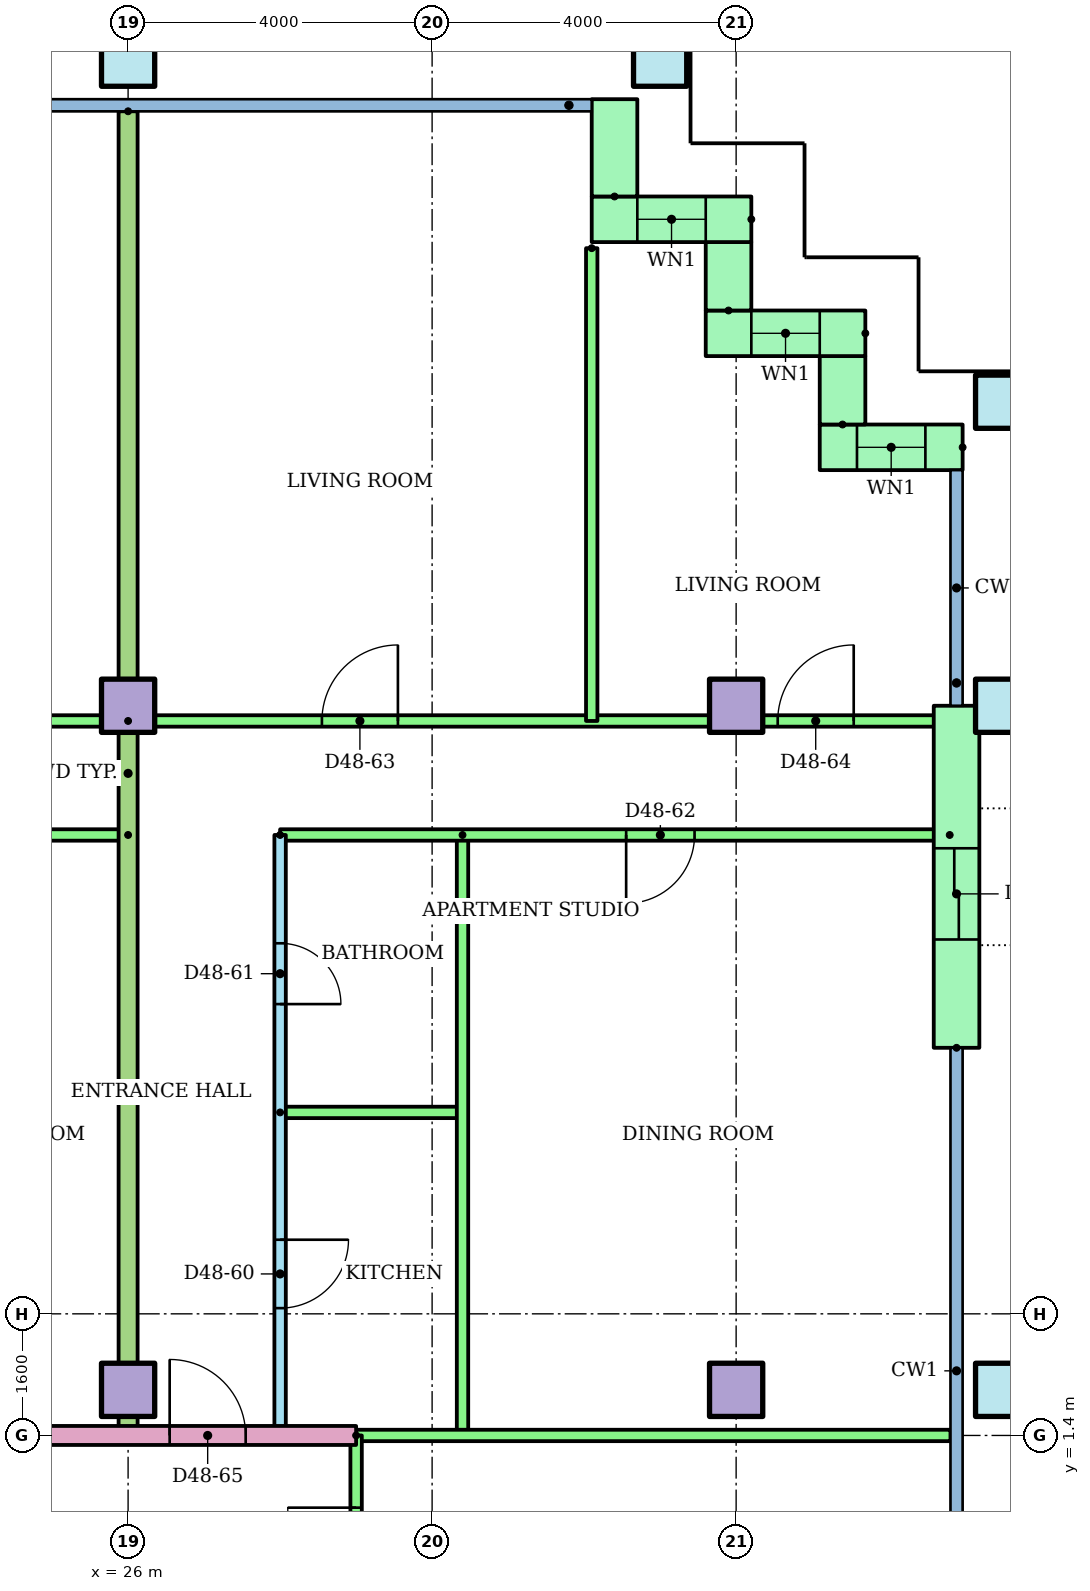
"""IFC4 building model, lengths in metres.
Left out: names, types, materials, properties, quantities, classifications, styles, units other than length and angle.
Written with IfcOpenShell. Run it as: python <this file> out.ifc"""

import sys

from ifc_helpers import new_model, si_unit, direction, frame, frame_2d, origin, origin_2d, place, context, subcontext, project, spatial, rectangle, hollow_rectangle, extrude, element, fill, save


model = new_model("IFC4")
c1 = context("Model", 3, precision=1e-05, world=origin(), true_north=direction((0.0, 1.0)))
c2 = subcontext(c1, "Body", "Model", "MODEL_VIEW")
j1 = project(units=[si_unit("LENGTHUNIT", "METRE"), si_unit("PLANEANGLEUNIT", "RADIAN")], contexts=[c1])
p1 = place(None, origin())
s1 = spatial("IfcSite", under=j1, at=p1, CompositionType="ELEMENT")
p2 = place(p1, origin())
s2 = spatial("IfcBuilding", under=s1, at=p2, CompositionType="ELEMENT")
p3 = place(p2, frame((0.0, 0.0, 184.5)))
s3 = spatial("IfcBuildingStorey", under=s2, at=p3, CompositionType="ELEMENT", Elevation=184.5)
for number, where in (
    (1, (26.0, 2.0, 0.0)),
    (2, (34.0, 2.0, 0.0)),
):
    element("IfcColumn", number, at=place(p3, frame(where)), inside=s3, PredefinedType="COLUMN", context=c2, shape_type="SweptSolid", body=[
        extrude(rectangle(XDim=0.7, YDim=0.7, at=origin_2d()), origin(), (0.0, 0.0, 1.0), 3.2),
    ])
p4 = place(p3, frame((37.5, 2.0, 0.0)))
e3 = element("IfcColumn", 3, at=p4, inside=s3, PredefinedType="COLUMN", context=c2, shape_type="SweptSolid", body=[
    extrude(hollow_rectangle(XDim=0.7, YDim=0.7, WallThickness=0.036, at=origin_2d()), origin(), (0.0, 0.0, 1.0), 3.2),
])
for number, where in (
    (4, (26.0, 11.0, 0.0)),
    (5, (34.0, 11.0, 0.0)),
):
    element("IfcColumn", number, at=place(p3, frame(where)), inside=s3, PredefinedType="COLUMN", context=c2, shape_type="SweptSolid", body=[
        extrude(rectangle(XDim=0.7, YDim=0.7, at=origin_2d()), origin(), (0.0, 0.0, 1.0), 3.2),
    ])
for number, where in (
    (6, (37.5, 11.0, 0.0)),
    (7, (37.5, 15.0, 0.0)),
    (8, (26.0, 19.5, 0.0)),
    (9, (33.0, 19.5, 0.0)),
):
    element("IfcColumn", number, at=place(p3, frame(where)), inside=s3, PredefinedType="COLUMN", context=c2, shape_type="SweptSolid", body=[
        extrude(hollow_rectangle(XDim=0.7, YDim=0.7, WallThickness=0.036, at=origin_2d()), origin(), (0.0, 0.0, 1.0), 3.2),
    ])
p5 = place(p3, frame((36.98, 14.4, 0.0), z_axis=(0.0, 0.0, 1.0), x_axis=(-1.0, 0.0, 0.0)))
e10 = element("IfcWall", 10, at=p5, inside=s3, PredefinedType="STANDARD", context=c2, shape_type="SweptSolid", body=[
    extrude(rectangle(XDim=1.88, YDim=0.6, at=frame_2d((0.94, 0.0))), origin(), (0.0, 0.0, 1.0), 2.92),
])
p6 = place(p5, frame((0.49, 0.0, 0.9)))
e11 = element("IfcOpeningElement", 11, at=p6, cuts=e10, PredefinedType="OPENING", context=c2, shape_type="SweptSolid", body=[
    extrude(rectangle(XDim=0.9, YDim=1.5, at=frame_2d((0.45, 0.75))), frame((0.0, 0.31, 0.0), z_axis=(0.0, -1.0, 0.0), x_axis=(1.0, 0.0, 0.0)), (0.0, 0.0, 1.0), 0.62),
])
p7 = place(p3, frame((35.4, 14.7, 0.0), z_axis=(0.0, 0.0, 1.0), x_axis=(0.0, 1.0, 0.0)))
e12 = element("IfcWall", 12, at=p7, inside=s3, PredefinedType="STANDARD", context=c2, shape_type="SweptSolid", body=[
    extrude(rectangle(XDim=0.9, YDim=0.6, at=frame_2d((0.45, 0.0))), origin(), (0.0, 0.0, 1.0), 2.92),
])
p8 = place(p3, frame((35.7, 15.9, 0.0), z_axis=(0.0, 0.0, 1.0), x_axis=(-1.0, 0.0, 0.0)))
e13 = element("IfcWall", 13, at=p8, inside=s3, PredefinedType="STANDARD", context=c2, shape_type="SweptSolid", body=[
    extrude(rectangle(XDim=2.1, YDim=0.6, at=frame_2d((1.05, 0.0))), origin(), (0.0, 0.0, 1.0), 2.92),
])
p9 = place(p8, frame((0.6, 0.0, 0.9)))
e14 = element("IfcOpeningElement", 14, at=p9, cuts=e13, PredefinedType="OPENING", context=c2, shape_type="SweptSolid", body=[
    extrude(rectangle(XDim=0.9, YDim=1.5, at=frame_2d((0.45, 0.75))), frame((0.0, 0.31, 0.0), z_axis=(0.0, -1.0, 0.0), x_axis=(1.0, 0.0, 0.0)), (0.0, 0.0, 1.0), 0.62),
])
p10 = place(p3, frame((33.9, 16.2, 0.0), z_axis=(0.0, 0.0, 1.0), x_axis=(0.0, 1.0, 0.0)))
e15 = element("IfcWall", 15, at=p10, inside=s3, PredefinedType="STANDARD", context=c2, shape_type="SweptSolid", body=[
    extrude(rectangle(XDim=0.9, YDim=0.6, at=frame_2d((0.45, 0.0))), origin(), (0.0, 0.0, 1.0), 2.92),
])
p11 = place(p3, frame((34.2, 17.4, 0.0), z_axis=(0.0, 0.0, 1.0), x_axis=(-1.0, 0.0, 0.0)))
e16 = element("IfcWall", 16, at=p11, inside=s3, PredefinedType="STANDARD", context=c2, shape_type="SweptSolid", body=[
    extrude(rectangle(XDim=2.1, YDim=0.6, at=frame_2d((1.05, 0.0))), origin(), (0.0, 0.0, 1.0), 2.92),
])
p12 = place(p11, frame((0.6, 0.0, 0.9)))
e17 = element("IfcOpeningElement", 17, at=p12, cuts=e16, PredefinedType="OPENING", context=c2, shape_type="SweptSolid", body=[
    extrude(rectangle(XDim=0.9, YDim=1.5, at=frame_2d((0.45, 0.75))), frame((0.0, 0.31, 0.0), z_axis=(0.0, -1.0, 0.0), x_axis=(1.0, 0.0, 0.0)), (0.0, 0.0, 1.0), 0.62),
])
p13 = place(p3, frame((32.4, 17.7, 0.0), z_axis=(0.0, 0.0, 1.0), x_axis=(0.0, 1.0, 0.0)))
e18 = element("IfcWall", 18, at=p13, inside=s3, PredefinedType="STANDARD", context=c2, shape_type="SweptSolid", body=[
    extrude(rectangle(XDim=1.28, YDim=0.6, at=frame_2d((0.64, 0.0))), origin(), (0.0, 0.0, 1.0), 2.92),
])
p14 = place(p3, frame((36.9, 6.5, 0.0), z_axis=(0.0, 0.0, 1.0), x_axis=(0.0, 1.0, 0.0)))
e19 = element("IfcWall", 19, at=p14, inside=s3, PredefinedType="STANDARD", context=c2, shape_type="SweptSolid", body=[
    extrude(rectangle(XDim=4.5, YDim=0.6, at=frame_2d((2.25, 0.0))), origin(), (0.0, 0.0, 1.0), 2.92),
])
p15 = place(p14, frame((1.425, 0.0, 0.0)))
e20 = element("IfcOpeningElement", 20, at=p15, cuts=e19, PredefinedType="OPENING", context=c2, shape_type="SweptSolid", body=[
    extrude(rectangle(XDim=1.2, YDim=2.1, at=frame_2d((0.6, 1.05))), frame((0.0, 0.31, 0.0), z_axis=(0.0, -1.0, 0.0), x_axis=(1.0, 0.0, 0.0)), (0.0, 0.0, 1.0), 0.62),
])
p16 = place(p3, frame((26.0, 9.3, 0.0), z_axis=(0.0, 0.0, 1.0), x_axis=(-1.0, 0.0, 0.0)))
e21 = element("IfcWall", 21, at=p16, inside=s3, PredefinedType="PARTITIONING", context=c2, shape_type="SweptSolid", body=[
    extrude(rectangle(XDim=10.0, YDim=0.15, at=frame_2d((5.0, 0.0))), origin(), (0.0, 0.0, 1.0), 2.4),
])
p17 = place(p16, frame((4.9, 0.0, 0.0)))
e22 = element("IfcOpeningElement", 22, at=p17, cuts=e21, PredefinedType="OPENING", context=c2, shape_type="SweptSolid", body=[
    extrude(rectangle(XDim=0.9, YDim=2.1, at=frame_2d((0.45, 1.05))), frame((0.0, 0.085, 0.0), z_axis=(0.0, -1.0, 0.0), x_axis=(1.0, 0.0, 0.0)), (0.0, 0.0, 1.0), 0.17),
])
p18 = place(p16, frame((1.1, 0.0, 0.0)))
e23 = element("IfcOpeningElement", 23, at=p18, cuts=e21, PredefinedType="OPENING", context=c2, shape_type="SweptSolid", body=[
    extrude(rectangle(XDim=0.9, YDim=2.1, at=frame_2d((0.45, 1.05))), frame((0.0, 0.085, 0.0), z_axis=(0.0, -1.0, 0.0), x_axis=(1.0, 0.0, 0.0)), (0.0, 0.0, 1.0), 0.17),
])
p19 = place(p3, frame((14.0, 10.8, 0.0)))
e24 = element("IfcWall", 24, at=p19, inside=s3, PredefinedType="PARTITIONING", context=c2, shape_type="SweptSolid", body=[
    extrude(rectangle(XDim=12.0, YDim=0.15, at=frame_2d((6.0, 0.0))), origin(), (0.0, 0.0, 1.0), 2.4),
])
p20 = place(p19, frame((1.5, 0.0, 0.0)))
e25 = element("IfcOpeningElement", 25, at=p20, cuts=e24, PredefinedType="OPENING", context=c2, shape_type="SweptSolid", body=[
    extrude(rectangle(XDim=1.0, YDim=2.1, at=frame_2d((0.5, 1.05))), frame((0.0, 0.085, 0.0), z_axis=(0.0, -1.0, 0.0), x_axis=(1.0, 0.0, 0.0)), (0.0, 0.0, 1.0), 0.17),
])
p21 = place(p19, frame((7.55, 0.0, 0.0)))
e26 = element("IfcOpeningElement", 26, at=p21, cuts=e24, PredefinedType="OPENING", context=c2, shape_type="SweptSolid", body=[
    extrude(rectangle(XDim=0.9, YDim=2.1, at=frame_2d((0.45, 1.05))), frame((0.0, 0.085, 0.0), z_axis=(0.0, -1.0, 0.0), x_axis=(1.0, 0.0, 0.0)), (0.0, 0.0, 1.0), 0.17),
])
p22 = place(p3, frame((28.0, 9.3, 0.0), z_axis=(0.0, 0.0, 1.0), x_axis=(0.0, -1.0, 0.0)))
e27 = element("IfcWall", 27, at=p22, inside=s3, PredefinedType="PARTITIONING", context=c2, shape_type="SweptSolid", body=[
    extrude(rectangle(XDim=7.9, YDim=0.15, at=frame_2d((3.95, 0.0))), origin(), (0.0, 0.0, 1.0), 2.4),
])
p23 = place(p22, frame((5.325, 0.0, 0.0)))
e28 = element("IfcOpeningElement", 28, at=p23, cuts=e27, PredefinedType="OPENING", context=c2, shape_type="SweptSolid", body=[
    extrude(rectangle(XDim=0.9, YDim=2.1, at=frame_2d((0.45, 1.05))), frame((0.0, 0.085, 0.0), z_axis=(0.0, -1.0, 0.0), x_axis=(1.0, 0.0, 0.0)), (0.0, 0.0, 1.0), 0.17),
])
p24 = place(p22, frame((1.425, 0.0, 0.0)))
e29 = element("IfcOpeningElement", 29, at=p24, cuts=e27, PredefinedType="OPENING", context=c2, shape_type="SweptSolid", body=[
    extrude(rectangle(XDim=0.8, YDim=2.1, at=frame_2d((0.4, 1.05))), frame((0.0, 0.085, 0.0), z_axis=(0.0, -1.0, 0.0), x_axis=(1.0, 0.0, 0.0)), (0.0, 0.0, 1.0), 0.17),
])
p25 = place(p3, frame((28.0, 5.65, 0.0)))
e30 = element("IfcWall", 30, at=p25, inside=s3, PredefinedType="PARTITIONING", context=c2, shape_type="SweptSolid", body=[
    extrude(rectangle(XDim=2.4, YDim=0.15, at=frame_2d((1.2, 0.0))), origin(), (0.0, 0.0, 1.0), 2.4),
])
p26 = place(p3, frame((30.4, 9.3, 0.0), z_axis=(0.0, 0.0, 1.0), x_axis=(0.0, -1.0, 0.0)))
e31 = element("IfcWall", 31, at=p26, inside=s3, PredefinedType="PARTITIONING", context=c2, shape_type="SweptSolid", body=[
    extrude(rectangle(XDim=7.9, YDim=0.15, at=frame_2d((3.95, 0.0))), origin(), (0.0, 0.0, 1.0), 2.4),
])
p27 = place(p3, frame((36.81, 9.3, 0.0), z_axis=(0.0, 0.0, 1.0), x_axis=(-1.0, 0.0, 0.0)))
e32 = element("IfcWall", 32, at=p27, inside=s3, PredefinedType="PARTITIONING", context=c2, shape_type="SweptSolid", body=[
    extrude(rectangle(XDim=8.81, YDim=0.15, at=frame_2d((4.405, 0.0))), origin(), (0.0, 0.0, 1.0), 2.4),
])
p28 = place(p27, frame((3.357, 0.0, 0.0)))
e33 = element("IfcOpeningElement", 33, at=p28, cuts=e32, PredefinedType="OPENING", context=c2, shape_type="SweptSolid", body=[
    extrude(rectangle(XDim=0.9, YDim=2.1, at=frame_2d((0.45, 1.05))), frame((0.0, 0.085, 0.0), z_axis=(0.0, -1.0, 0.0), x_axis=(1.0, 0.0, 0.0)), (0.0, 0.0, 1.0), 0.17),
])
p29 = place(p3, frame((26.0, 10.8, 0.0)))
e34 = element("IfcWall", 34, at=p29, inside=s3, PredefinedType="PARTITIONING", context=c2, shape_type="SweptSolid", body=[
    extrude(rectangle(XDim=10.81, YDim=0.15, at=frame_2d((5.405, 0.0))), origin(), (0.0, 0.0, 1.0), 2.4),
])
p30 = place(p29, frame((2.55, 0.0, 0.0)))
e35 = element("IfcOpeningElement", 35, at=p30, cuts=e34, PredefinedType="OPENING", context=c2, shape_type="SweptSolid", body=[
    extrude(rectangle(XDim=1.0, YDim=2.1, at=frame_2d((0.5, 1.05))), frame((0.0, 0.085, 0.0), z_axis=(0.0, -1.0, 0.0), x_axis=(1.0, 0.0, 0.0)), (0.0, 0.0, 1.0), 0.17),
])
p31 = place(p29, frame((8.547, 0.0, 0.0)))
e36 = element("IfcOpeningElement", 36, at=p31, cuts=e34, PredefinedType="OPENING", context=c2, shape_type="SweptSolid", body=[
    extrude(rectangle(XDim=1.0, YDim=2.1, at=frame_2d((0.5, 1.05))), frame((0.0, 0.085, 0.0), z_axis=(0.0, -1.0, 0.0), x_axis=(1.0, 0.0, 0.0)), (0.0, 0.0, 1.0), 0.17),
])
p32 = place(p3, frame((32.1, 17.02, 0.0), z_axis=(0.0, 0.0, 1.0), x_axis=(0.0, -1.0, 0.0)))
e37 = element("IfcWall", 37, at=p32, inside=s3, PredefinedType="PARTITIONING", context=c2, shape_type="SweptSolid", body=[
    extrude(rectangle(XDim=6.22, YDim=0.15, at=frame_2d((3.11, 0.0))), origin(), (0.0, 0.0, 1.0), 2.4),
])
p33 = place(p3, frame((26.0, 18.821, 0.0), z_axis=(0.0, 0.0, 1.0), x_axis=(0.0, -1.0, 0.0)))
e38 = element("IfcWall", 38, at=p33, inside=s3, PredefinedType="PARTITIONING", context=c2, shape_type="SweptSolid", body=[
    extrude(rectangle(XDim=17.421, YDim=0.25, at=frame_2d((8.71, 0.0))), origin(), (0.0, 0.0, 1.0), 2.4),
])
p34 = place(p3, frame((14.0, 1.4, 0.0)))
e39 = element("IfcWall", 39, at=p34, inside=s3, PredefinedType="PARTITIONING", context=c2, shape_type="SweptSolid", body=[
    extrude(rectangle(XDim=15.0, YDim=0.25, at=frame_2d((7.5, 0.0))), origin(), (0.0, 0.0, 1.0), 2.4),
])
p35 = place(p34, frame((0.5, 0.0, 0.0)))
e40 = element("IfcOpeningElement", 40, at=p35, cuts=e39, PredefinedType="OPENING", context=c2, shape_type="SweptSolid", body=[
    extrude(rectangle(XDim=1.0, YDim=2.1, at=frame_2d((0.5, 1.05))), frame((0.0, 0.135, 0.0), z_axis=(0.0, -1.0, 0.0), x_axis=(1.0, 0.0, 0.0)), (0.0, 0.0, 1.0), 0.27),
])
p36 = place(p34, frame((12.547, 0.0, 0.0)))
e41 = element("IfcOpeningElement", 41, at=p36, cuts=e39, PredefinedType="OPENING", context=c2, shape_type="SweptSolid", body=[
    extrude(rectangle(XDim=1.0, YDim=2.1, at=frame_2d((0.5, 1.05))), frame((0.0, 0.135, 0.0), z_axis=(0.0, -1.0, 0.0), x_axis=(1.0, 0.0, 0.0)), (0.0, 0.0, 1.0), 0.27),
])
p37 = place(p3, frame((29.0, 1.4, 0.0)))
e42 = element("IfcWall", 42, at=p37, inside=s3, PredefinedType="PARTITIONING", context=c2, shape_type="SweptSolid", body=[
    extrude(rectangle(XDim=7.82, YDim=0.15, at=frame_2d((3.91, 0.0))), origin(), (0.0, 0.0, 1.0), 2.4),
])
p38 = place(p3, frame((29.0, -1.4, 0.0), z_axis=(0.0, 0.0, 1.0), x_axis=(0.0, 1.0, 0.0)))
e43 = element("IfcWall", 43, at=p38, inside=s3, PredefinedType="PARTITIONING", context=c2, shape_type="SweptSolid", body=[
    extrude(rectangle(XDim=2.8, YDim=0.15, at=frame_2d((1.4, 0.0))), origin(), (0.0, 0.0, 1.0), 2.4),
])
p39 = place(p38, frame((0.95, 0.0, 0.0)))
e44 = element("IfcOpeningElement", 44, at=p39, cuts=e43, PredefinedType="OPENING", context=c2, shape_type="SweptSolid", body=[
    extrude(rectangle(XDim=0.9, YDim=2.1, at=frame_2d((0.45, 1.05))), frame((0.0, 0.085, 0.0), z_axis=(0.0, -1.0, 0.0), x_axis=(1.0, 0.0, 0.0)), (0.0, 0.0, 1.0), 0.17),
])
p40 = place(p6, origin())
e45 = element("IfcWindow", 45, at=p40, inside=s3, PartitioningType="SINGLE_PANEL", PredefinedType="WINDOW", context=c2, shape_type="SweptSolid", body=[
    extrude(rectangle(XDim=0.9, YDim=1.5, at=frame_2d((0.45, 0.75))), frame((0.0, 0.03, 0.0), z_axis=(0.0, -1.0, 0.0), x_axis=(1.0, 0.0, 0.0)), (0.0, 0.0, 1.0), 0.06),
])
fill(e11, e45)
p41 = place(p9, origin())
e46 = element("IfcWindow", 46, at=p41, inside=s3, PartitioningType="SINGLE_PANEL", PredefinedType="WINDOW", context=c2, shape_type="SweptSolid", body=[
    extrude(rectangle(XDim=0.9, YDim=1.5, at=frame_2d((0.45, 0.75))), frame((0.0, 0.03, 0.0), z_axis=(0.0, -1.0, 0.0), x_axis=(1.0, 0.0, 0.0)), (0.0, 0.0, 1.0), 0.06),
])
fill(e14, e46)
p42 = place(p12, origin())
e47 = element("IfcWindow", 47, at=p42, inside=s3, PartitioningType="SINGLE_PANEL", PredefinedType="WINDOW", context=c2, shape_type="SweptSolid", body=[
    extrude(rectangle(XDim=0.9, YDim=1.5, at=frame_2d((0.45, 0.75))), frame((0.0, 0.03, 0.0), z_axis=(0.0, -1.0, 0.0), x_axis=(1.0, 0.0, 0.0)), (0.0, 0.0, 1.0), 0.06),
])
fill(e17, e47)
p43 = place(p23, origin())
e48 = element("IfcDoor", 48, at=p43, inside=s3, OperationType="SINGLE_SWING_LEFT", PredefinedType="DOOR", context=c2, shape_type="SweptSolid", body=[
    extrude(rectangle(XDim=0.9, YDim=2.1, at=frame_2d((0.45, 1.05))), frame((0.0, 0.025, 0.0), z_axis=(0.0, -1.0, 0.0), x_axis=(1.0, 0.0, 0.0)), (0.0, 0.0, 1.0), 0.05),
])
fill(e28, e48)
p44 = place(p24, origin())
e49 = element("IfcDoor", 49, at=p44, inside=s3, OperationType="SINGLE_SWING_RIGHT", PredefinedType="DOOR", context=c2, shape_type="SweptSolid", body=[
    extrude(rectangle(XDim=0.8, YDim=2.1, at=frame_2d((0.4, 1.05))), frame((0.0, 0.025, 0.0), z_axis=(0.0, -1.0, 0.0), x_axis=(1.0, 0.0, 0.0)), (0.0, 0.0, 1.0), 0.05),
])
fill(e29, e49)
p45 = place(p28, origin())
e50 = element("IfcDoor", 50, at=p45, inside=s3, OperationType="SINGLE_SWING_RIGHT", PredefinedType="DOOR", context=c2, shape_type="SweptSolid", body=[
    extrude(rectangle(XDim=0.9, YDim=2.1, at=frame_2d((0.45, 1.05))), frame((0.0, 0.025, 0.0), z_axis=(0.0, -1.0, 0.0), x_axis=(1.0, 0.0, 0.0)), (0.0, 0.0, 1.0), 0.05),
])
fill(e33, e50)
p46 = place(p30, origin())
e51 = element("IfcDoor", 51, at=p46, inside=s3, OperationType="SINGLE_SWING_RIGHT", PredefinedType="DOOR", context=c2, shape_type="SweptSolid", body=[
    extrude(rectangle(XDim=1.0, YDim=2.1, at=frame_2d((0.5, 1.05))), frame((0.0, 0.025, 0.0), z_axis=(0.0, -1.0, 0.0), x_axis=(1.0, 0.0, 0.0)), (0.0, 0.0, 1.0), 0.05),
])
fill(e35, e51)
p47 = place(p31, origin())
e52 = element("IfcDoor", 52, at=p47, inside=s3, OperationType="SINGLE_SWING_RIGHT", PredefinedType="DOOR", context=c2, shape_type="SweptSolid", body=[
    extrude(rectangle(XDim=1.0, YDim=2.1, at=frame_2d((0.5, 1.05))), frame((0.0, 0.025, 0.0), z_axis=(0.0, -1.0, 0.0), x_axis=(1.0, 0.0, 0.0)), (0.0, 0.0, 1.0), 0.05),
])
fill(e36, e52)
p48 = place(p36, origin())
e53 = element("IfcDoor", 53, at=p48, inside=s3, OperationType="SINGLE_SWING_LEFT", PredefinedType="DOOR", context=c2, shape_type="SweptSolid", body=[
    extrude(rectangle(XDim=1.0, YDim=2.1, at=frame_2d((0.5, 1.05))), frame((0.0, 0.025, 0.0), z_axis=(0.0, -1.0, 0.0), x_axis=(1.0, 0.0, 0.0)), (0.0, 0.0, 1.0), 0.05),
])
fill(e41, e53)
p49 = place(p39, origin())
e54 = element("IfcDoor", 54, at=p49, inside=s3, OperationType="SINGLE_SWING_RIGHT", PredefinedType="DOOR", context=c2, shape_type="SweptSolid", body=[
    extrude(rectangle(XDim=0.9, YDim=2.1, at=frame_2d((0.45, 1.05))), frame((0.0, 0.025, 0.0), z_axis=(0.0, -1.0, 0.0), x_axis=(1.0, 0.0, 0.0)), (0.0, 0.0, 1.0), 0.05),
])
fill(e44, e54)
p50 = place(p15, origin())
e55 = element("IfcDoor", 55, at=p50, inside=s3, OperationType="SLIDING_TO_LEFT", PredefinedType="DOOR", context=c2, shape_type="SweptSolid", body=[
    extrude(rectangle(XDim=1.2, YDim=2.1, at=frame_2d((0.6, 1.05))), frame((0.0, 0.025, 0.0), z_axis=(0.0, -1.0, 0.0), x_axis=(1.0, 0.0, 0.0)), (0.0, 0.0, 1.0), 0.05),
])
fill(e20, e55)
save(model, sys.argv[1])
